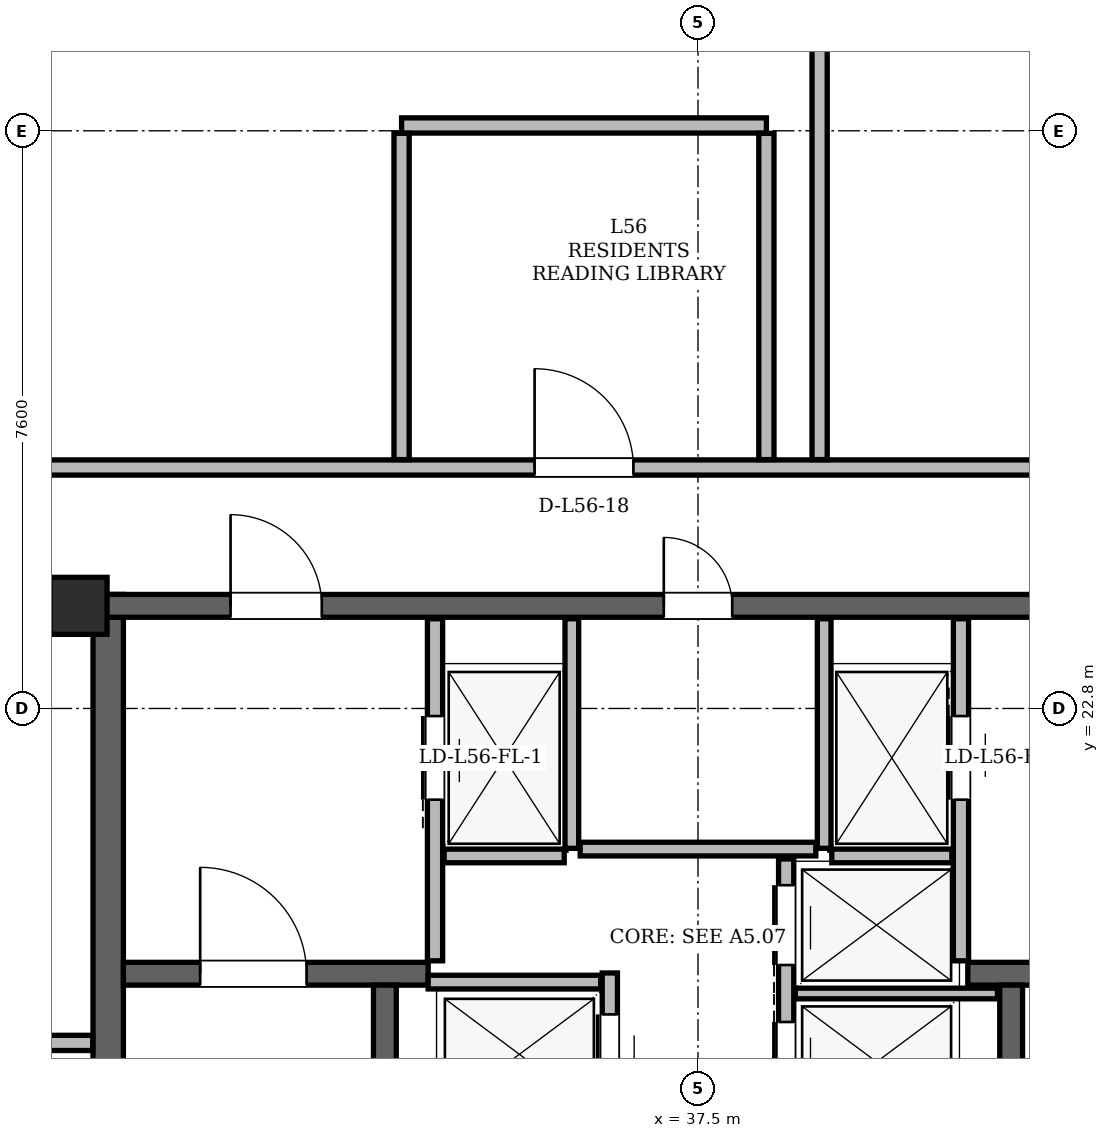
"""IFC4 building model, lengths in metres.
Left out: names, types, materials, properties, quantities, classifications, styles, units other than length and angle.
Written with IfcOpenShell. Run it as: python <this file> out.ifc"""

import sys

from ifc_helpers import new_model, si_unit, direction, frame, frame_2d, origin, origin_2d, place, context, subcontext, project, spatial, rectangle, hollow_rectangle, extrude, element, fill, save


model = new_model("IFC4")
c1 = context("Model", 3, precision=1e-05, world=origin(), true_north=direction((0.0, 1.0)))
c2 = subcontext(c1, "Body", "Model", "MODEL_VIEW")
j1 = project(units=[si_unit("LENGTHUNIT", "METRE"), si_unit("PLANEANGLEUNIT", "RADIAN")], contexts=[c1])
p1 = place(None, origin())
s1 = spatial("IfcSite", under=j1, at=p1, CompositionType="ELEMENT")
p2 = place(p1, origin())
s2 = spatial("IfcBuilding", under=s1, at=p2, CompositionType="ELEMENT")
p3 = place(p2, frame((0.0, 0.0, 212.7)))
s3 = spatial("IfcBuildingStorey", under=s2, at=p3, CompositionType="ELEMENT", Elevation=212.7)
p4 = place(p3, frame((29.35, 24.15, 0.0), z_axis=(0.0, 0.0, 1.0), x_axis=(1.0, 0.0, 0.0)))
e1 = element("IfcColumn", 1, at=p4, inside=s3, PredefinedType="COLUMN", context=c2, shape_type="SweptSolid", body=[
    extrude(hollow_rectangle(XDim=0.75, YDim=0.75, WallThickness=0.06, at=origin_2d()), origin(), (0.0, 0.0, 1.0), 3.6),
])
p5 = place(p3, frame((29.74, 11.0, 0.0), z_axis=(0.0, 0.0, 1.0), x_axis=(0.0, 1.0, 0.0)))
e2 = element("IfcWall", 2, at=p5, inside=s3, PredefinedType="SHEAR", context=c2, shape_type="SweptSolid", body=[
    extrude(rectangle(XDim=13.3, YDim=0.4, at=frame_2d((6.65, 0.0))), origin(), (0.0, 0.0, 1.0), 3.38),
])
p6 = place(p3, frame((29.65, 24.15, 0.0), z_axis=(0.0, 0.0, 1.0), x_axis=(1.0, 0.0, 0.0)))
e3 = element("IfcWall", 3, at=p6, inside=s3, PredefinedType="SHEAR", context=c2, shape_type="SweptSolid", body=[
    extrude(rectangle(XDim=15.7, YDim=0.3, at=frame_2d((7.85, 0.0))), origin(), (0.0, 0.0, 1.0), 3.38),
])
p7 = place(p6, frame((1.7, 0.0, 0.0)))
e4 = element("IfcOpeningElement", 4, at=p7, cuts=e3, PredefinedType="OPENING", context=c2, shape_type="SweptSolid", body=[
    extrude(rectangle(XDim=1.2, YDim=2.2, at=frame_2d((0.6, 1.1))), frame((0.0, 0.15, 0.0), z_axis=(0.0, -1.0, 0.0), x_axis=(1.0, 0.0, 0.0)), (0.0, 0.0, 1.0), 0.3),
])
p8 = place(p6, frame((12.8, 0.0, 0.0)))
e5 = element("IfcOpeningElement", 5, at=p8, cuts=e3, PredefinedType="OPENING", context=c2, shape_type="SweptSolid", body=[
    extrude(rectangle(XDim=1.2, YDim=2.2, at=frame_2d((0.6, 1.1))), frame((0.0, 0.15, 0.0), z_axis=(0.0, -1.0, 0.0), x_axis=(1.0, 0.0, 0.0)), (0.0, 0.0, 1.0), 0.3),
])
p9 = place(p6, frame((7.4, 0.0, 0.0)))
e6 = element("IfcOpeningElement", 6, at=p9, cuts=e3, PredefinedType="OPENING", context=c2, shape_type="SweptSolid", body=[
    extrude(rectangle(XDim=0.9, YDim=2.05, at=frame_2d((0.45, 1.025))), frame((0.0, 0.15, 0.0), z_axis=(0.0, -1.0, 0.0), x_axis=(1.0, 0.0, 0.0)), (0.0, 0.0, 1.0), 0.3),
])
p10 = place(p3, frame((29.94, 19.31, 0.0), z_axis=(0.0, 0.0, 1.0), x_axis=(1.0, 0.0, 0.0)))
e7 = element("IfcWall", 7, at=p10, inside=s3, PredefinedType="SHEAR", context=c2, shape_type="SweptSolid", body=[
    extrude(rectangle(XDim=4.01, YDim=0.3, at=frame_2d((2.005, 0.0))), origin(), (0.0, 0.0, 1.0), 3.38),
])
p11 = place(p10, frame((1.01, 0.0, 0.0)))
e8 = element("IfcOpeningElement", 8, at=p11, cuts=e7, PredefinedType="OPENING", context=c2, shape_type="SweptSolid", body=[
    extrude(rectangle(XDim=1.4, YDim=2.2, at=frame_2d((0.7, 1.1))), frame((0.0, 0.15, 0.0), z_axis=(0.0, -1.0, 0.0), x_axis=(1.0, 0.0, 0.0)), (0.0, 0.0, 1.0), 0.3),
])
p12 = place(p3, frame((41.05, 19.31, 0.0), z_axis=(0.0, 0.0, 1.0), x_axis=(1.0, 0.0, 0.0)))
e9 = element("IfcWall", 9, at=p12, inside=s3, PredefinedType="SHEAR", context=c2, shape_type="SweptSolid", body=[
    extrude(rectangle(XDim=4.01, YDim=0.3, at=frame_2d((2.005, 0.0))), origin(), (0.0, 0.0, 1.0), 3.38),
])
p13 = place(p12, frame((1.6, 0.0, 0.0)))
e10 = element("IfcOpeningElement", 10, at=p13, cuts=e9, PredefinedType="OPENING", context=c2, shape_type="SweptSolid", body=[
    extrude(rectangle(XDim=1.4, YDim=2.2, at=frame_2d((0.7, 1.1))), frame((0.0, 0.15, 0.0), z_axis=(0.0, -1.0, 0.0), x_axis=(1.0, 0.0, 0.0)), (0.0, 0.0, 1.0), 0.3),
])
for number, where, z_axis, x_axis in (
    (11, (33.38, 11.54, 0.0), (0.0, 0.0, 1.0), (0.0, 1.0, 0.0)),
    (12, (41.62, 11.54, 0.0), (0.0, 0.0, 1.0), (0.0, 1.0, 0.0)),
):
    element("IfcWall", number, at=place(p3, frame(where, z_axis=z_axis, x_axis=x_axis)), inside=s3, PredefinedType="SHEAR", context=c2, shape_type="SweptSolid", body=[
        extrude(rectangle(XDim=7.62, YDim=0.3, at=frame_2d((3.81, 0.0))), origin(), (0.0, 0.0, 1.0), 3.38),
    ])
p14 = place(p3, frame((59.201, 11.543, 0.0), z_axis=(0.0, 0.0, 1.0), x_axis=(-0.499999040053, 0.866025958009, 0.0)))
e13 = element("IfcWall", 13, at=p14, inside=s3, PredefinedType="SOLIDWALL", context=c2, shape_type="SweptSolid", body=[
    extrude(rectangle(XDim=36.523, YDim=0.29, at=frame_2d((18.261, 0.0))), origin(), (0.0, 0.0, 1.0), 2.677),
])
p15 = place(p14, frame((8.034, 0.0, 0.0)))
e14 = element("IfcOpeningElement", 14, at=p15, cuts=e13, PredefinedType="OPENING", context=c2, shape_type="SweptSolid", body=[
    extrude(rectangle(XDim=1.5, YDim=2.2, at=frame_2d((0.75, 1.1))), frame((0.0, 0.145, 0.0), z_axis=(0.0, -1.0, 0.0), x_axis=(1.0, 0.0, 0.0)), (0.0, 0.0, 1.0), 0.29),
])
p16 = place(p14, frame((31.594, 0.0, 0.0)))
e15 = element("IfcOpeningElement", 15, at=p16, cuts=e13, PredefinedType="OPENING", context=c2, shape_type="SweptSolid", body=[
    extrude(rectangle(XDim=1.5, YDim=2.2, at=frame_2d((0.75, 1.1))), frame((0.0, 0.145, 0.0), z_axis=(0.0, -1.0, 0.0), x_axis=(1.0, 0.0, 0.0)), (0.0, 0.0, 1.0), 0.29),
])
p17 = place(p14, frame((12.291, 0.0, 0.85)))
e16 = element("IfcOpeningElement", 16, at=p17, cuts=e13, PredefinedType="OPENING", context=c2, shape_type="SweptSolid", body=[
    extrude(rectangle(XDim=1.4, YDim=1.6, at=frame_2d((0.7, 0.8))), frame((0.0, 0.145, 0.0), z_axis=(0.0, -1.0, 0.0), x_axis=(1.0, 0.0, 0.0)), (0.0, 0.0, 1.0), 0.29),
])
p18 = place(p14, frame((2.252, 0.0, 0.85)))
e17 = element("IfcOpeningElement", 17, at=p18, cuts=e13, PredefinedType="OPENING", context=c2, shape_type="SweptSolid", body=[
    extrude(rectangle(XDim=1.2, YDim=1.48, at=frame_2d((0.6, 0.74))), frame((0.0, 0.145, 0.0), z_axis=(0.0, -1.0, 0.0), x_axis=(1.0, 0.0, 0.0)), (0.0, 0.0, 1.0), 0.29),
])
p19 = place(p14, frame((16.093, 0.0, 0.85)))
e18 = element("IfcOpeningElement", 18, at=p19, cuts=e13, PredefinedType="OPENING", context=c2, shape_type="SweptSolid", body=[
    extrude(rectangle(XDim=3.0, YDim=1.717, at=frame_2d((1.5, 0.858))), frame((0.0, 0.145, 0.0), z_axis=(0.0, -1.0, 0.0), x_axis=(1.0, 0.0, 0.0)), (0.0, 0.0, 1.0), 0.29),
])
p20 = place(p14, frame((23.458, 0.0, 0.85)))
e19 = element("IfcOpeningElement", 19, at=p20, cuts=e13, PredefinedType="OPENING", context=c2, shape_type="SweptSolid", body=[
    extrude(rectangle(XDim=1.2, YDim=1.48, at=frame_2d((0.6, 0.74))), frame((0.0, 0.145, 0.0), z_axis=(0.0, -1.0, 0.0), x_axis=(1.0, 0.0, 0.0)), (0.0, 0.0, 1.0), 0.29),
])
p21 = place(p14, frame((34.061, 0.0, 0.85)))
e20 = element("IfcOpeningElement", 20, at=p21, cuts=e13, PredefinedType="OPENING", context=c2, shape_type="SweptSolid", body=[
    extrude(rectangle(XDim=1.2, YDim=1.48, at=frame_2d((0.6, 0.74))), frame((0.0, 0.145, 0.0), z_axis=(0.0, -1.0, 0.0), x_axis=(1.0, 0.0, 0.0)), (0.0, 0.0, 1.0), 0.29),
])
p22 = place(p3, frame((34.06, 43.173, 0.0), z_axis=(0.0, 0.0, 1.0), x_axis=(-0.499999040053, -0.866025958009, 0.0)))
e21 = element("IfcWall", 21, at=p22, inside=s3, PredefinedType="SOLIDWALL", context=c2, shape_type="SweptSolid", body=[
    extrude(rectangle(XDim=36.523, YDim=0.29, at=frame_2d((18.261, 0.0))), origin(), (0.0, 0.0, 1.0), 2.677),
])
p23 = place(p22, frame((8.034, 0.0, 0.0)))
e22 = element("IfcOpeningElement", 22, at=p23, cuts=e21, PredefinedType="OPENING", context=c2, shape_type="SweptSolid", body=[
    extrude(rectangle(XDim=1.5, YDim=2.2, at=frame_2d((0.75, 1.1))), frame((0.0, 0.145, 0.0), z_axis=(0.0, -1.0, 0.0), x_axis=(1.0, 0.0, 0.0)), (0.0, 0.0, 1.0), 0.29),
])
p24 = place(p22, frame((28.233, 0.0, 0.0)))
e23 = element("IfcOpeningElement", 23, at=p24, cuts=e21, PredefinedType="OPENING", context=c2, shape_type="SweptSolid", body=[
    extrude(rectangle(XDim=1.5, YDim=2.2, at=frame_2d((0.75, 1.1))), frame((0.0, 0.145, 0.0), z_axis=(0.0, -1.0, 0.0), x_axis=(1.0, 0.0, 0.0)), (0.0, 0.0, 1.0), 0.29),
])
p25 = place(p22, frame((32.257, 0.0, 0.85)))
e24 = element("IfcOpeningElement", 24, at=p25, cuts=e21, PredefinedType="OPENING", context=c2, shape_type="SweptSolid", body=[
    extrude(rectangle(XDim=2.2, YDim=1.717, at=frame_2d((1.1, 0.858))), frame((0.0, 0.145, 0.0), z_axis=(0.0, -1.0, 0.0), x_axis=(1.0, 0.0, 0.0)), (0.0, 0.0, 1.0), 0.29),
])
p26 = place(p22, frame((22.716, 0.0, 0.85)))
e25 = element("IfcOpeningElement", 25, at=p26, cuts=e21, PredefinedType="OPENING", context=c2, shape_type="SweptSolid", body=[
    extrude(rectangle(XDim=1.2, YDim=1.48, at=frame_2d((0.6, 0.74))), frame((0.0, 0.145, 0.0), z_axis=(0.0, -1.0, 0.0), x_axis=(1.0, 0.0, 0.0)), (0.0, 0.0, 1.0), 0.29),
])
p27 = place(p22, frame((26.483, 0.0, 0.85)))
e26 = element("IfcOpeningElement", 26, at=p27, cuts=e21, PredefinedType="OPENING", context=c2, shape_type="SweptSolid", body=[
    extrude(rectangle(XDim=1.2, YDim=1.48, at=frame_2d((0.6, 0.74))), frame((0.0, 0.145, 0.0), z_axis=(0.0, -1.0, 0.0), x_axis=(1.0, 0.0, 0.0)), (0.0, 0.0, 1.0), 0.29),
])
p28 = place(p3, frame((34.04, 19.48, 0.0), z_axis=(0.0, 0.0, 1.0), x_axis=(0.0, 1.0, 0.0)))
e27 = element("IfcWall", 27, at=p28, inside=s3, PredefinedType="PARTITIONING", context=c2, shape_type="SweptSolid", body=[
    extrude(rectangle(XDim=4.5, YDim=0.2, at=frame_2d((2.25, 0.0))), origin(), (0.0, 0.0, 1.0), 3.38),
])
p29 = place(p28, frame((2.12, 0.0, 0.0)))
e28 = element("IfcOpeningElement", 28, at=p29, cuts=e27, PredefinedType="OPENING", context=c2, shape_type="SweptSolid", body=[
    extrude(rectangle(XDim=1.1, YDim=2.2, at=frame_2d((0.55, 1.1))), frame((0.0, 0.1, 0.0), z_axis=(0.0, -1.0, 0.0), x_axis=(1.0, 0.0, 0.0)), (0.0, 0.0, 1.0), 0.2),
])
p30 = place(p3, frame((35.84, 20.96, 0.0), z_axis=(0.0, 0.0, 1.0), x_axis=(0.0, 1.0, 0.0)))
e29 = element("IfcWall", 29, at=p30, inside=s3, PredefinedType="PARTITIONING", context=c2, shape_type="SweptSolid", body=[
    extrude(rectangle(XDim=3.02, YDim=0.18, at=frame_2d((1.51, 0.0))), origin(), (0.0, 0.0, 1.0), 3.38),
])
p31 = place(p3, frame((34.16, 20.86, 0.0), z_axis=(0.0, 0.0, 1.0), x_axis=(1.0, 0.0, 0.0)))
e30 = element("IfcWall", 30, at=p31, inside=s3, PredefinedType="PARTITIONING", context=c2, shape_type="SweptSolid", body=[
    extrude(rectangle(XDim=1.58, YDim=0.18, at=frame_2d((0.79, 0.0))), origin(), (0.0, 0.0, 1.0), 3.38),
])
p32 = place(p3, frame((40.96, 19.48, 0.0), z_axis=(0.0, 0.0, 1.0), x_axis=(0.0, 1.0, 0.0)))
e31 = element("IfcWall", 31, at=p32, inside=s3, PredefinedType="PARTITIONING", context=c2, shape_type="SweptSolid", body=[
    extrude(rectangle(XDim=4.5, YDim=0.2, at=frame_2d((2.25, 0.0))), origin(), (0.0, 0.0, 1.0), 3.38),
])
p33 = place(p32, frame((2.12, 0.0, 0.0)))
e32 = element("IfcOpeningElement", 32, at=p33, cuts=e31, PredefinedType="OPENING", context=c2, shape_type="SweptSolid", body=[
    extrude(rectangle(XDim=1.1, YDim=2.2, at=frame_2d((0.55, 1.1))), frame((0.0, 0.1, 0.0), z_axis=(0.0, -1.0, 0.0), x_axis=(1.0, 0.0, 0.0)), (0.0, 0.0, 1.0), 0.2),
])
p34 = place(p3, frame((39.16, 20.96, 0.0), z_axis=(0.0, 0.0, 1.0), x_axis=(0.0, 1.0, 0.0)))
e33 = element("IfcWall", 33, at=p34, inside=s3, PredefinedType="PARTITIONING", context=c2, shape_type="SweptSolid", body=[
    extrude(rectangle(XDim=3.02, YDim=0.18, at=frame_2d((1.51, 0.0))), origin(), (0.0, 0.0, 1.0), 3.38),
])
p35 = place(p3, frame((39.26, 20.86, 0.0), z_axis=(0.0, 0.0, 1.0), x_axis=(1.0, 0.0, 0.0)))
e34 = element("IfcWall", 34, at=p35, inside=s3, PredefinedType="PARTITIONING", context=c2, shape_type="SweptSolid", body=[
    extrude(rectangle(XDim=1.58, YDim=0.18, at=frame_2d((0.79, 0.0))), origin(), (0.0, 0.0, 1.0), 3.38),
])
p36 = place(p3, frame((36.34, 17.25, 0.0), z_axis=(0.0, 0.0, 1.0), x_axis=(0.0, 1.0, 0.0)))
e35 = element("IfcWall", 35, at=p36, inside=s3, PredefinedType="PARTITIONING", context=c2, shape_type="SweptSolid", body=[
    extrude(rectangle(XDim=2.07, YDim=0.2, at=frame_2d((1.035, 0.0))), origin(), (0.0, 0.0, 1.0), 3.38),
])
p37 = place(p36, frame((0.475, 0.0, 0.0)))
e36 = element("IfcOpeningElement", 36, at=p37, cuts=e35, PredefinedType="OPENING", context=c2, shape_type="SweptSolid", body=[
    extrude(rectangle(XDim=1.05, YDim=2.15, at=frame_2d((0.525, 1.075))), frame((0.0, 0.1, 0.0), z_axis=(0.0, -1.0, 0.0), x_axis=(1.0, 0.0, 0.0)), (0.0, 0.0, 1.0), 0.2),
])
p38 = place(p3, frame((33.95, 19.2, 0.0), z_axis=(0.0, 0.0, 1.0), x_axis=(1.0, 0.0, 0.0)))
e37 = element("IfcWall", 37, at=p38, inside=s3, PredefinedType="PARTITIONING", context=c2, shape_type="SweptSolid", body=[
    extrude(rectangle(XDim=2.27, YDim=0.18, at=frame_2d((1.135, 0.0))), origin(), (0.0, 0.0, 1.0), 3.38),
])
p39 = place(p3, frame((38.66, 17.2, 0.0), z_axis=(0.0, 0.0, 1.0), x_axis=(0.0, 1.0, 0.0)))
e38 = element("IfcWall", 38, at=p39, inside=s3, PredefinedType="PARTITIONING", context=c2, shape_type="SweptSolid", body=[
    extrude(rectangle(XDim=3.62, YDim=0.2, at=frame_2d((1.81, 0.0))), origin(), (0.0, 0.0, 1.0), 3.38),
])
p40 = place(p39, frame((0.425, 0.0, 0.0)))
e39 = element("IfcOpeningElement", 39, at=p40, cuts=e38, PredefinedType="OPENING", context=c2, shape_type="SweptSolid", body=[
    extrude(rectangle(XDim=1.05, YDim=2.15, at=frame_2d((0.525, 1.075))), frame((0.0, 0.1, 0.0), z_axis=(0.0, -1.0, 0.0), x_axis=(1.0, 0.0, 0.0)), (0.0, 0.0, 1.0), 0.2),
])
p41 = place(p39, frame((2.225, 0.0, 0.0)))
e40 = element("IfcOpeningElement", 40, at=p41, cuts=e38, PredefinedType="OPENING", context=c2, shape_type="SweptSolid", body=[
    extrude(rectangle(XDim=1.05, YDim=2.15, at=frame_2d((0.525, 1.075))), frame((0.0, 0.1, 0.0), z_axis=(0.0, -1.0, 0.0), x_axis=(1.0, 0.0, 0.0)), (0.0, 0.0, 1.0), 0.2),
])
p42 = place(p3, frame((38.78, 19.05, 0.0), z_axis=(0.0, 0.0, 1.0), x_axis=(1.0, 0.0, 0.0)))
e41 = element("IfcWall", 41, at=p42, inside=s3, PredefinedType="PARTITIONING", context=c2, shape_type="SweptSolid", body=[
    extrude(rectangle(XDim=2.66, YDim=0.14, at=frame_2d((1.33, 0.0))), origin(), (0.0, 0.0, 1.0), 3.38),
])
p43 = place(p3, frame((35.95, 20.95, 0.0), z_axis=(0.0, 0.0, 1.0), x_axis=(1.0, 0.0, 0.0)))
e42 = element("IfcWall", 42, at=p43, inside=s3, PredefinedType="PARTITIONING", context=c2, shape_type="SweptSolid", body=[
    extrude(rectangle(XDim=3.1, YDim=0.18, at=frame_2d((1.55, 0.0))), origin(), (0.0, 0.0, 1.0), 3.38),
])
p44 = place(p3, frame((19.93, 18.4, 0.0), z_axis=(0.0, 0.0, 1.0), x_axis=(1.0, 0.0, 0.0)))
e43 = element("IfcWall", 43, at=p44, inside=s3, PredefinedType="PARTITIONING", context=c2, shape_type="SweptSolid", body=[
    extrude(rectangle(XDim=9.606, YDim=0.2, at=frame_2d((4.803, 0.0))), origin(), (0.0, 0.0, 1.0), 2.52),
])
p45 = place(p3, frame((25.6, 25.97, 0.0), z_axis=(0.0, 0.0, 1.0), x_axis=(1.0, 0.0, 0.0)))
e44 = element("IfcWall", 44, at=p45, inside=s3, PredefinedType="PARTITIONING", context=c2, shape_type="SweptSolid", body=[
    extrude(rectangle(XDim=21.85, YDim=0.2, at=frame_2d((10.925, 0.0))), origin(), (0.0, 0.0, 1.0), 2.913),
])
p46 = place(p45, frame((9.75, 0.0, 0.0)))
e45 = element("IfcOpeningElement", 45, at=p46, cuts=e44, PredefinedType="OPENING", context=c2, shape_type="SweptSolid", body=[
    extrude(rectangle(XDim=1.3, YDim=2.2, at=frame_2d((0.65, 1.1))), frame((0.0, 0.1, 0.0), z_axis=(0.0, -1.0, 0.0), x_axis=(1.0, 0.0, 0.0)), (0.0, 0.0, 1.0), 0.2),
])
p47 = place(p45, frame((17.154, 0.0, 0.0)))
e46 = element("IfcOpeningElement", 46, at=p47, cuts=e44, PredefinedType="OPENING", context=c2, shape_type="SweptSolid", body=[
    extrude(rectangle(XDim=1.0, YDim=2.18, at=frame_2d((0.5, 1.09))), frame((0.0, 0.1, 0.0), z_axis=(0.0, -1.0, 0.0), x_axis=(1.0, 0.0, 0.0)), (0.0, 0.0, 1.0), 0.2),
])
p48 = place(p3, frame((33.6, 30.47, 0.0), z_axis=(0.0, 0.0, 1.0), x_axis=(1.0, 0.0, 0.0)))
e47 = element("IfcWall", 47, at=p48, inside=s3, PredefinedType="PARTITIONING", context=c2, shape_type="SweptSolid", body=[
    extrude(rectangle(XDim=4.8, YDim=0.2, at=frame_2d((2.4, 0.0))), origin(), (0.0, 0.0, 1.0), 3.38),
])
for number, where, z_axis, x_axis in (
    (48, (33.6, 26.074, 0.0), (0.0, 0.0, 1.0), (0.0, 1.0, 0.0)),
    (49, (38.4, 26.074, 0.0), (0.0, 0.0, 1.0), (0.0, 1.0, 0.0)),
):
    element("IfcWall", number, at=place(p3, frame(where, z_axis=z_axis, x_axis=x_axis)), inside=s3, PredefinedType="PARTITIONING", context=c2, shape_type="SweptSolid", body=[
        extrude(rectangle(XDim=4.292, YDim=0.2, at=frame_2d((2.146, 0.0))), origin(), (0.0, 0.0, 1.0), 3.38),
    ])
p49 = place(p3, frame((39.1, 26.074, 0.0), z_axis=(0.0, 0.0, 1.0), x_axis=(0.0, 1.0, 0.0)))
e50 = element("IfcWall", 50, at=p49, inside=s3, PredefinedType="PARTITIONING", context=c2, shape_type="SweptSolid", body=[
    extrude(rectangle(XDim=16.949, YDim=0.2, at=frame_2d((8.475, 0.0))), origin(), (0.0, 0.0, 1.0), 3.38),
])
p50 = place(p29, origin())
e51 = element("IfcDoor", 51, at=p50, inside=s3, OperationType="SLIDING_TO_LEFT", PredefinedType="DOOR", context=c2, shape_type="SweptSolid", body=[
    extrude(rectangle(XDim=1.1, YDim=2.2, at=frame_2d((0.55, 1.1))), frame((0.0, 0.025, 0.0), z_axis=(0.0, -1.0, 0.0), x_axis=(1.0, 0.0, 0.0)), (0.0, 0.0, 1.0), 0.05),
])
fill(e28, e51)
p51 = place(p33, origin())
e52 = element("IfcDoor", 52, at=p51, inside=s3, OperationType="SLIDING_TO_RIGHT", PredefinedType="DOOR", context=c2, shape_type="SweptSolid", body=[
    extrude(rectangle(XDim=1.1, YDim=2.2, at=frame_2d((0.55, 1.1))), frame((0.0, 0.025, 0.0), z_axis=(0.0, -1.0, 0.0), x_axis=(1.0, 0.0, 0.0)), (0.0, 0.0, 1.0), 0.05),
])
fill(e32, e52)
p52 = place(p37, origin())
e53 = element("IfcDoor", 53, at=p52, inside=s3, OperationType="SLIDING_TO_LEFT", PredefinedType="DOOR", context=c2, shape_type="SweptSolid", body=[
    extrude(rectangle(XDim=1.05, YDim=2.15, at=frame_2d((0.525, 1.075))), frame((0.0, 0.025, 0.0), z_axis=(0.0, -1.0, 0.0), x_axis=(1.0, 0.0, 0.0)), (0.0, 0.0, 1.0), 0.05),
])
fill(e36, e53)
p53 = place(p40, origin())
e54 = element("IfcDoor", 54, at=p53, inside=s3, OperationType="SLIDING_TO_RIGHT", PredefinedType="DOOR", context=c2, shape_type="SweptSolid", body=[
    extrude(rectangle(XDim=1.05, YDim=2.15, at=frame_2d((0.525, 1.075))), frame((0.0, 0.025, 0.0), z_axis=(0.0, -1.0, 0.0), x_axis=(1.0, 0.0, 0.0)), (0.0, 0.0, 1.0), 0.05),
])
fill(e39, e54)
p54 = place(p41, origin())
e55 = element("IfcDoor", 55, at=p54, inside=s3, OperationType="SLIDING_TO_LEFT", PredefinedType="DOOR", context=c2, shape_type="SweptSolid", body=[
    extrude(rectangle(XDim=1.05, YDim=2.15, at=frame_2d((0.525, 1.075))), frame((0.0, 0.025, 0.0), z_axis=(0.0, -1.0, 0.0), x_axis=(1.0, 0.0, 0.0)), (0.0, 0.0, 1.0), 0.05),
])
fill(e40, e55)
p55 = place(p11, origin())
e56 = element("IfcDoor", 56, at=p55, inside=s3, OperationType="SINGLE_SWING_LEFT", PredefinedType="DOOR", context=c2, shape_type="SweptSolid", body=[
    extrude(rectangle(XDim=1.4, YDim=2.2, at=frame_2d((0.7, 1.1))), frame((0.0, 0.025, 0.0), z_axis=(0.0, -1.0, 0.0), x_axis=(1.0, 0.0, 0.0)), (0.0, 0.0, 1.0), 0.05),
])
fill(e8, e56)
p56 = place(p7, origin())
e57 = element("IfcDoor", 57, at=p56, inside=s3, OperationType="SINGLE_SWING_LEFT", PredefinedType="DOOR", context=c2, shape_type="SweptSolid", body=[
    extrude(rectangle(XDim=1.2, YDim=2.2, at=frame_2d((0.6, 1.1))), frame((0.0, 0.025, 0.0), z_axis=(0.0, -1.0, 0.0), x_axis=(1.0, 0.0, 0.0)), (0.0, 0.0, 1.0), 0.05),
])
fill(e4, e57)
p57 = place(p9, origin())
e58 = element("IfcDoor", 58, at=p57, inside=s3, OperationType="SINGLE_SWING_LEFT", PredefinedType="DOOR", context=c2, shape_type="SweptSolid", body=[
    extrude(rectangle(XDim=0.9, YDim=2.05, at=frame_2d((0.45, 1.025))), frame((0.0, 0.025, 0.0), z_axis=(0.0, -1.0, 0.0), x_axis=(1.0, 0.0, 0.0)), (0.0, 0.0, 1.0), 0.05),
])
fill(e6, e58)
p58 = place(p46, origin())
e59 = element("IfcDoor", 59, at=p58, inside=s3, OperationType="SINGLE_SWING_LEFT", PredefinedType="DOOR", context=c2, shape_type="SweptSolid", body=[
    extrude(rectangle(XDim=1.3, YDim=2.2, at=frame_2d((0.65, 1.1))), frame((0.0, 0.025, 0.0), z_axis=(0.0, -1.0, 0.0), x_axis=(1.0, 0.0, 0.0)), (0.0, 0.0, 1.0), 0.05),
])
fill(e45, e59)
save(model, sys.argv[1])
